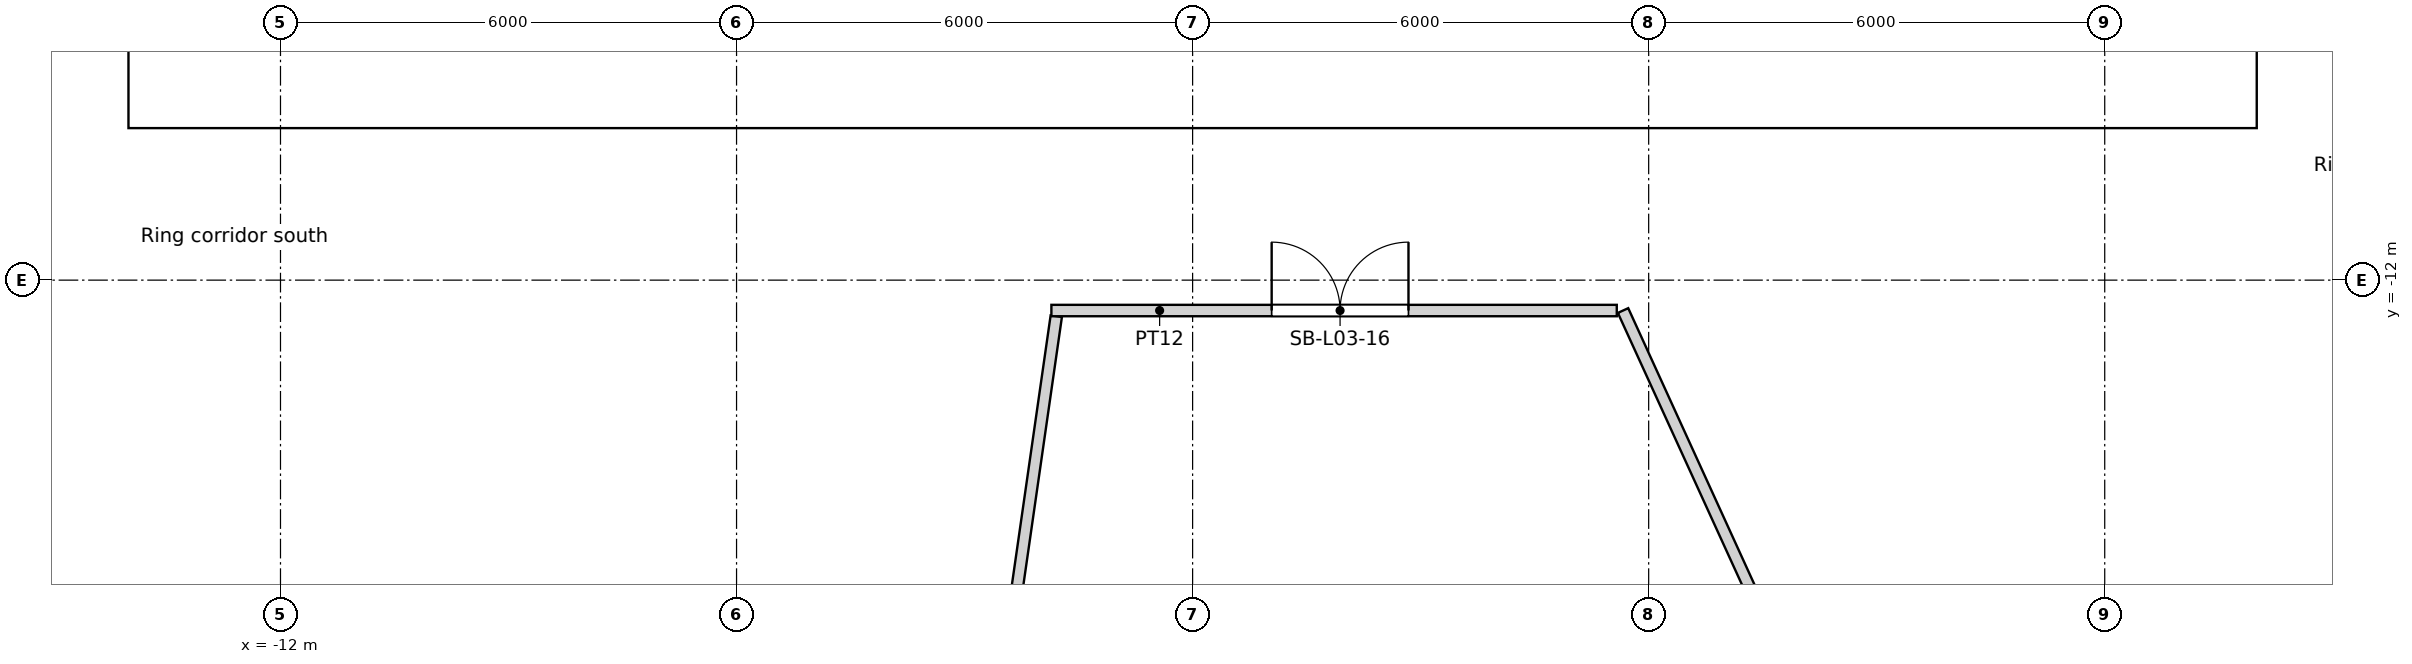
"""IFC4 building model, lengths in metres.
Left out: names, types, materials, properties, quantities, classifications, styles, units other than length and angle.
Written with IfcOpenShell. Run it as: python <this file> out.ifc"""

import sys

from ifc_helpers import new_model, si_unit, direction, frame, frame_2d, origin, origin_2d, place, context, subcontext, project, spatial, rectangle, circle, extrude, element, fill, save


model = new_model("IFC4")
c1 = context("Model", 3, precision=1e-05, world=origin(), true_north=direction((0.0, 1.0)))
c2 = subcontext(c1, "Body", "Model", "MODEL_VIEW")
j1 = project(units=[si_unit("LENGTHUNIT", "METRE"), si_unit("PLANEANGLEUNIT", "RADIAN")], contexts=[c1])
p1 = place(None, origin())
s1 = spatial("IfcSite", under=j1, at=p1, CompositionType="ELEMENT")
p2 = place(p1, origin())
s2 = spatial("IfcBuilding", under=s1, at=p2, CompositionType="ELEMENT")
p3 = place(p2, frame((0.0, 0.0, 18.6)))
s3 = spatial("IfcBuildingStorey", under=s2, at=p3, CompositionType="ELEMENT", Elevation=18.6)
for number, where, z_axis, x_axis in (
    (1, (-13.798, -12.802, 0.0), (0.0, 0.0, 1.0), (1.0, 0.0, 0.0)),
    (2, (-9.411, -16.301, 0.0), (0.0, 0.0, 1.0), (1.0, 0.0, 0.0)),
    (3, (11.735, -14.716, 0.0), (0.0, 0.0, 1.0), (1.0, 0.0, 0.0)),
    (4, (15.552, -10.603, 0.0), (0.0, 0.0, 1.0), (1.0, 0.0, 0.0)),
):
    element("IfcColumn", number, at=place(p3, frame(where, z_axis=z_axis, x_axis=x_axis)), inside=s3, PredefinedType="COLUMN", context=c2, shape_type="SweptSolid", body=[
        extrude(circle(Radius=0.8, at=origin_2d()), origin(), (0.0, 0.0, 1.0), 4.8),
    ])
p4 = place(p3, frame((-14.0, -9.4, 0.0), z_axis=(0.0, 0.0, 1.0), x_axis=(1.0, 0.0, 0.0)))
e5 = element("IfcWall", 5, at=p4, inside=s3, PredefinedType="SOLIDWALL", context=c2, shape_type="SweptSolid", body=[
    extrude(rectangle(XDim=28.0, YDim=1.2, at=frame_2d((14.0, 0.0))), origin(), (0.0, 0.0, 1.0), 4.8),
])
p5 = place(p4, frame((14.9, 0.0, 0.0)))
e6 = element("IfcOpeningElement", 6, at=p5, cuts=e5, PredefinedType="OPENING", context=c2, shape_type="SweptSolid", body=[
    extrude(rectangle(XDim=1.0, YDim=2.1, at=frame_2d((0.5, 1.05))), frame((0.0, 0.6, 0.0), z_axis=(0.0, -1.0, 0.0), x_axis=(1.0, 0.0, 0.0)), (0.0, 0.0, 1.0), 1.2),
])
p6 = place(p4, frame((9.8, 0.0, 0.0)))
e7 = element("IfcOpeningElement", 7, at=p6, cuts=e5, PredefinedType="OPENING", context=c2, shape_type="SweptSolid", body=[
    extrude(rectangle(XDim=1.8, YDim=2.1, at=frame_2d((0.9, 1.05))), frame((0.0, 0.6, 0.0), z_axis=(0.0, -1.0, 0.0), x_axis=(1.0, 0.0, 0.0)), (0.0, 0.0, 1.0), 1.2),
])
p7 = place(p4, frame((16.4, 0.0, 0.0)))
e8 = element("IfcOpeningElement", 8, at=p7, cuts=e5, PredefinedType="OPENING", context=c2, shape_type="SweptSolid", body=[
    extrude(rectangle(XDim=1.8, YDim=2.1, at=frame_2d((0.9, 1.05))), frame((0.0, 0.6, 0.0), z_axis=(0.0, -1.0, 0.0), x_axis=(1.0, 0.0, 0.0)), (0.0, 0.0, 1.0), 1.2),
])
p8 = place(p3, frame((-3.874, -26.943, 0.0), z_axis=(0.0, 0.0, 1.0), x_axis=(0.142302842894, 0.989823166482, 0.0)))
e9 = element("IfcWall", 9, at=p8, inside=s3, PredefinedType="PARTITIONING", context=c2, shape_type="SweptSolid", body=[
    extrude(rectangle(XDim=14.617, YDim=0.15, at=frame_2d((7.309, 0.0))), origin(), (0.0, 0.0, 1.0), 3.75),
])
p9 = place(p3, frame((5.58, -12.4, 0.0), z_axis=(0.0, 0.0, 1.0), x_axis=(-1.0, 0.0, 0.0)))
e10 = element("IfcWall", 10, at=p9, inside=s3, PredefinedType="PARTITIONING", context=c2, shape_type="SweptSolid", body=[
    extrude(rectangle(XDim=7.438, YDim=0.15, at=frame_2d((3.719, 0.0))), origin(), (0.0, 0.0, 1.0), 3.75),
])
p10 = place(p9, frame((2.74, 0.0, 0.0)))
e11 = element("IfcOpeningElement", 11, at=p10, cuts=e10, PredefinedType="OPENING", context=c2, shape_type="SweptSolid", body=[
    extrude(rectangle(XDim=1.8, YDim=2.4, at=frame_2d((0.9, 1.2))), frame((0.0, 0.075, 0.0), z_axis=(0.0, -1.0, 0.0), x_axis=(1.0, 0.0, 0.0)), (0.0, 0.0, 1.0), 0.15),
])
p11 = place(p3, frame((10.205, -22.347, 0.0), z_axis=(0.0, 0.0, 1.0), x_axis=(-0.415410432201, 0.909634087322, 0.0)))
e12 = element("IfcWall", 12, at=p11, inside=s3, PredefinedType="PARTITIONING", context=c2, shape_type="SweptSolid", body=[
    extrude(rectangle(XDim=10.935, YDim=0.15, at=frame_2d((5.467, 0.0))), origin(), (0.0, 0.0, 1.0), 3.75),
])
p12 = place(p5, origin())
e13 = element("IfcDoor", 13, at=p12, inside=s3, OperationType="SINGLE_SWING_LEFT", PredefinedType="DOOR", context=c2, shape_type="SweptSolid", body=[
    extrude(rectangle(XDim=1.0, YDim=2.1, at=frame_2d((0.5, 1.05))), frame((0.0, 0.025, 0.0), z_axis=(0.0, -1.0, 0.0), x_axis=(1.0, 0.0, 0.0)), (0.0, 0.0, 1.0), 0.05),
])
fill(e6, e13)
p13 = place(p6, origin())
e14 = element("IfcDoor", 14, at=p13, inside=s3, OperationType="DOUBLE_DOOR_SINGLE_SWING", PredefinedType="DOOR", context=c2, shape_type="SweptSolid", body=[
    extrude(rectangle(XDim=1.8, YDim=2.1, at=frame_2d((0.9, 1.05))), frame((0.0, 0.025, 0.0), z_axis=(0.0, -1.0, 0.0), x_axis=(1.0, 0.0, 0.0)), (0.0, 0.0, 1.0), 0.05),
])
fill(e7, e14)
p14 = place(p7, origin())
e15 = element("IfcDoor", 15, at=p14, inside=s3, OperationType="DOUBLE_DOOR_SINGLE_SWING", PredefinedType="DOOR", context=c2, shape_type="SweptSolid", body=[
    extrude(rectangle(XDim=1.8, YDim=2.1, at=frame_2d((0.9, 1.05))), frame((0.0, 0.025, 0.0), z_axis=(0.0, -1.0, 0.0), x_axis=(1.0, 0.0, 0.0)), (0.0, 0.0, 1.0), 0.05),
])
fill(e8, e15)
p15 = place(p10, origin())
e16 = element("IfcDoor", 16, at=p15, inside=s3, OperationType="DOUBLE_DOOR_SINGLE_SWING", PredefinedType="DOOR", context=c2, shape_type="SweptSolid", body=[
    extrude(rectangle(XDim=1.8, YDim=2.4, at=frame_2d((0.9, 1.2))), frame((0.0, 0.025, 0.0), z_axis=(0.0, -1.0, 0.0), x_axis=(1.0, 0.0, 0.0)), (0.0, 0.0, 1.0), 0.05),
])
fill(e11, e16)
save(model, sys.argv[1])
